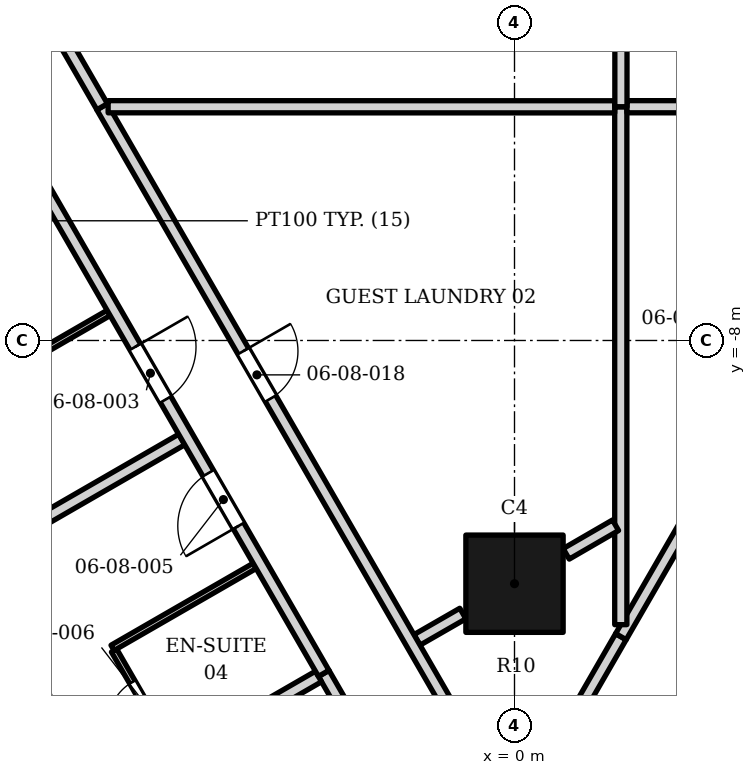
"""IFC4 building model, lengths in metres.
Left out: names, types, materials, properties, quantities, classifications, styles, units other than length and angle.
Written with IfcOpenShell. Run it as: python <this file> out.ifc"""

import sys

from ifc_helpers import new_model, si_unit, direction, frame, frame_2d, origin, origin_2d, place, context, subcontext, project, spatial, rectangle, extrude, element, fill, save


model = new_model("IFC4")
c1 = context("Model", 3, precision=1e-05, world=origin(), true_north=direction((0.0, 1.0)))
c2 = subcontext(c1, "Body", "Model", "MODEL_VIEW")
j1 = project(units=[si_unit("LENGTHUNIT", "METRE"), si_unit("PLANEANGLEUNIT", "RADIAN")], contexts=[c1])
p1 = place(None, origin())
s1 = spatial("IfcSite", under=j1, at=p1, CompositionType="ELEMENT")
p2 = place(p1, origin())
s2 = spatial("IfcBuilding", under=s1, at=p2, CompositionType="ELEMENT")
p3 = place(p2, frame((0.0, 0.0, 46.0)))
s3 = spatial("IfcBuildingStorey", under=s2, at=p3, CompositionType="ELEMENT", Elevation=46.0)
p4 = place(p3, frame((0.0, -12.0, 0.0), z_axis=(0.0, 0.0, 1.0), x_axis=(1.0, 0.0, 0.0)))
e1 = element("IfcColumn", 1, at=p4, inside=s3, PredefinedType="COLUMN", context=c2, shape_type="SweptSolid", body=[
    extrude(rectangle(XDim=1.6, YDim=1.6, at=origin_2d()), origin(), (0.0, 0.0, 1.0), 3.4),
])
p5 = place(p3, frame((-3.137, -13.476, 0.0), z_axis=(0.0, 0.0, 1.0), x_axis=(0.499989943423, -0.866031209874, 0.0)))
e2 = element("IfcWall", 2, at=p5, inside=s3, PredefinedType="PARTITIONING", context=c2, shape_type="SweptSolid", body=[
    extrude(rectangle(XDim=4.398, YDim=0.2, at=frame_2d((2.199, 0.0))), origin(), (0.0, 0.0, 1.0), 3.23),
])
p6 = place(p5, frame((1.798, 0.0, 0.0)))
e3 = element("IfcOpeningElement", 3, at=p6, cuts=e2, PredefinedType="OPENING", context=c2, shape_type="SweptSolid", body=[
    extrude(rectangle(XDim=0.9, YDim=2.1, at=frame_2d((0.45, 1.05))), frame((0.0, 0.11, 0.0), z_axis=(0.0, -1.0, 0.0), x_axis=(1.0, 0.0, 0.0)), (0.0, 0.0, 1.0), 0.22),
])
p7 = place(p3, frame((0.05, -15.818, 0.0), z_axis=(0.0, 0.0, 1.0), x_axis=(0.499521489101, 0.866301495974, 0.0)))
e4 = element("IfcWall", 4, at=p7, inside=s3, PredefinedType="PARTITIONING", context=c2, shape_type="SweptSolid", body=[
    extrude(rectangle(XDim=3.401, YDim=0.2, at=frame_2d((1.7, 0.0))), origin(), (0.0, 0.0, 1.0), 2.628),
])
p8 = place(p7, frame((1.2, 0.0, 0.0)))
e5 = element("IfcOpeningElement", 5, at=p8, cuts=e4, PredefinedType="OPENING", context=c2, shape_type="SweptSolid", body=[
    extrude(rectangle(XDim=0.9, YDim=2.1, at=frame_2d((0.45, 1.05))), frame((0.0, 0.11, 0.0), z_axis=(0.0, -1.0, 0.0), x_axis=(1.0, 0.0, 0.0)), (0.0, 0.0, 1.0), 0.22),
])
p9 = place(p3, frame((-5.563, -14.874, 0.0), z_axis=(0.0, 0.0, 1.0), x_axis=(0.866384216157, 0.499378003114, 0.0)))
e6 = element("IfcWall", 6, at=p9, inside=s3, PredefinedType="PARTITIONING", context=c2, shape_type="SweptSolid", body=[
    extrude(rectangle(XDim=2.7, YDim=0.2, at=frame_2d((1.35, 0.0))), origin(), (0.0, 0.0, 1.0), 2.552),
])
p10 = place(p3, frame((-6.586, -13.098, 0.0), z_axis=(0.0, 0.0, 1.0), x_axis=(0.49995005938, -0.866054235095, 0.0)))
e7 = element("IfcWall", 7, at=p10, inside=s3, PredefinedType="PARTITIONING", context=c2, shape_type="SweptSolid", body=[
    extrude(rectangle(XDim=1.95, YDim=0.1, at=frame_2d((0.975, 0.0))), origin(), (0.0, 0.0, 1.0), 3.23),
])
p11 = place(p10, frame((0.6, 0.0, 0.0)))
e8 = element("IfcOpeningElement", 8, at=p11, cuts=e7, PredefinedType="OPENING", context=c2, shape_type="SweptSolid", body=[
    extrude(rectangle(XDim=0.8, YDim=2.1, at=frame_2d((0.4, 1.05))), frame((0.0, 0.06, 0.0), z_axis=(0.0, -1.0, 0.0), x_axis=(1.0, 0.0, 0.0)), (0.0, 0.0, 1.0), 0.12),
])
p12 = place(p3, frame((-1.604, -12.924, 0.0), z_axis=(0.0, 0.0, 1.0), x_axis=(0.866960927484, 0.498376113207, 0.0)))
e9 = element("IfcWall", 9, at=p12, inside=s3, PredefinedType="PARTITIONING", context=c2, shape_type="SweptSolid", body=[
    extrude(rectangle(XDim=0.869, YDim=0.2, at=frame_2d((0.435, 0.0))), origin(), (0.0, 0.0, 1.0), 3.23),
])
p13 = place(p3, frame((1.75, -12.87, 0.0), z_axis=(0.0, 0.0, 1.0), x_axis=(0.499999309361, 0.866025802525, 0.0)))
e10 = element("IfcWall", 10, at=p13, inside=s3, PredefinedType="PARTITIONING", context=c2, shape_type="SweptSolid", body=[
    extrude(rectangle(XDim=19.134, YDim=0.2, at=frame_2d((9.567, 0.0))), origin(), (0.0, 0.0, 1.0), 2.302),
])
p14 = place(p13, frame((14.098, 0.0, 0.0)))
e11 = element("IfcOpeningElement", 11, at=p14, cuts=e10, PredefinedType="OPENING", context=c2, shape_type="SweptSolid", body=[
    extrude(rectangle(XDim=1.0, YDim=2.1, at=frame_2d((0.5, 1.05))), frame((0.0, 0.11, 0.0), z_axis=(0.0, -1.0, 0.0), x_axis=(1.0, 0.0, 0.0)), (0.0, 0.0, 1.0), 0.22),
])
p15 = place(p13, frame((4.53, 0.0, 0.0)))
e12 = element("IfcOpeningElement", 12, at=p15, cuts=e10, PredefinedType="OPENING", context=c2, shape_type="SweptSolid", body=[
    extrude(rectangle(XDim=1.0, YDim=2.1, at=frame_2d((0.5, 1.05))), frame((0.0, 0.11, 0.0), z_axis=(0.0, -1.0, 0.0), x_axis=(1.0, 0.0, 0.0)), (0.0, 0.0, 1.0), 0.22),
])
p16 = place(p3, frame((1.748, -12.674, 0.0), z_axis=(0.0, 0.0, 1.0), x_axis=(0.0, 1.0, 0.0)))
e13 = element("IfcWall", 13, at=p16, inside=s3, PredefinedType="PARTITIONING", context=c2, shape_type="SweptSolid", body=[
    extrude(rectangle(XDim=8.516, YDim=0.2, at=frame_2d((4.258, 0.0))), origin(), (0.0, 0.0, 1.0), 2.302),
])
p17 = place(p3, frame((-6.611, -13.054, 0.0), z_axis=(0.0, 0.0, 1.0), x_axis=(0.866339109022, 0.499456252518, 0.0)))
e14 = element("IfcWall", 14, at=p17, inside=s3, PredefinedType="PARTITIONING", context=c2, shape_type="SweptSolid", body=[
    extrude(rectangle(XDim=2.7, YDim=0.1, at=frame_2d((1.35, 0.0))), origin(), (0.0, 0.0, 1.0), 2.302),
])
p18 = place(p3, frame((0.85, -11.509, 0.0), z_axis=(0.0, 0.0, 1.0), x_axis=(0.865248014814, 0.501344066345, 0.0)))
e15 = element("IfcWall", 15, at=p18, inside=s3, PredefinedType="PARTITIONING", context=c2, shape_type="SweptSolid", body=[
    extrude(rectangle(XDim=0.938, YDim=0.2, at=frame_2d((0.469, 0.0))), origin(), (0.0, 0.0, 1.0), 3.23),
])
p19 = place(p3, frame((-11.751, -13.251, 0.0), z_axis=(0.0, 0.0, 1.0), x_axis=(0.866134002969, 0.499811853502, 0.0)))
e16 = element("IfcWall", 16, at=p19, inside=s3, PredefinedType="PARTITIONING", context=c2, shape_type="SweptSolid", body=[
    extrude(rectangle(XDim=7.25, YDim=0.2, at=frame_2d((3.625, 0.0))), origin(), (0.0, 0.0, 1.0), 2.302),
])
p20 = place(p19, frame((1.3, 0.0, 0.0)))
e17 = element("IfcOpeningElement", 17, at=p20, cuts=e16, PredefinedType="OPENING", context=c2, shape_type="SweptSolid", body=[
    extrude(rectangle(XDim=0.9, YDim=2.1, at=frame_2d((0.45, 1.05))), frame((0.0, 0.11, 0.0), z_axis=(0.0, -1.0, 0.0), x_axis=(1.0, 0.0, 0.0)), (0.0, 0.0, 1.0), 0.22),
])
p21 = place(p3, frame((-9.011, -8.898, 0.0), z_axis=(0.0, 0.0, 1.0), x_axis=(0.865671764241, 0.500612022024, 0.0)))
e18 = element("IfcWall", 18, at=p21, inside=s3, PredefinedType="PARTITIONING", context=c2, shape_type="SweptSolid", body=[
    extrude(rectangle(XDim=2.7, YDim=0.1, at=frame_2d((1.35, 0.0))), origin(), (0.0, 0.0, 1.0), 2.552),
])
p22 = place(p3, frame((-6.783, -4.156, 0.0), z_axis=(0.0, 0.0, 1.0), x_axis=(0.500162761554, -0.865931412962, 0.0)))
e19 = element("IfcWall", 19, at=p22, inside=s3, PredefinedType="PARTITIONING", context=c2, shape_type="SweptSolid", body=[
    extrude(rectangle(XDim=13.566, YDim=0.2, at=frame_2d((6.783, 0.0))), origin(), (0.0, 0.0, 1.0), 2.302),
])
p23 = place(p22, frame((4.642, 0.0, 0.0)))
e20 = element("IfcOpeningElement", 20, at=p23, cuts=e19, PredefinedType="OPENING", context=c2, shape_type="SweptSolid", body=[
    extrude(rectangle(XDim=0.9, YDim=2.1, at=frame_2d((0.45, 1.05))), frame((0.0, 0.11, 0.0), z_axis=(0.0, -1.0, 0.0), x_axis=(1.0, 0.0, 0.0)), (0.0, 0.0, 1.0), 0.22),
])
p24 = place(p3, frame((-6.683, -4.156, 0.0), z_axis=(0.0, 0.0, 1.0), x_axis=(0.99999997896, -0.000205134212, 0.0)))
e21 = element("IfcWall", 21, at=p24, inside=s3, PredefinedType="PARTITIONING", context=c2, shape_type="SweptSolid", body=[
    extrude(rectangle(XDim=8.331, YDim=0.2, at=frame_2d((4.166, 0.0))), origin(), (0.0, 0.0, 1.0), 3.23),
])
p25 = place(p3, frame((1.85, -4.156, 0.0), z_axis=(0.0, 0.0, 1.0), x_axis=(0.999999937456, -0.000353678232, 0.0)))
e22 = element("IfcWall", 22, at=p25, inside=s3, PredefinedType="PARTITIONING", context=c2, shape_type="SweptSolid", body=[
    extrude(rectangle(XDim=4.832, YDim=0.2, at=frame_2d((2.416, 0.0))), origin(), (0.0, 0.0, 1.0), 3.23),
])
p26 = place(p3, frame((-9.937, -1.698, 0.0), z_axis=(0.0, 0.0, 1.0), x_axis=(0.500001173101, -0.866024726493, 0.0)))
e23 = element("IfcWall", 23, at=p26, inside=s3, PredefinedType="PARTITIONING", context=c2, shape_type="SweptSolid", body=[
    extrude(rectangle(XDim=13.598, YDim=0.2, at=frame_2d((6.799, 0.0))), origin(), (0.0, 0.0, 1.0), 2.302),
])
p27 = place(p26, frame((0.598, 0.0, 0.0)))
e24 = element("IfcOpeningElement", 24, at=p27, cuts=e23, PredefinedType="OPENING", context=c2, shape_type="SweptSolid", body=[
    extrude(rectangle(XDim=1.1, YDim=2.1, at=frame_2d((0.55, 1.05))), frame((0.0, 0.11, 0.0), z_axis=(0.0, -1.0, 0.0), x_axis=(1.0, 0.0, 0.0)), (0.0, 0.0, 1.0), 0.22),
])
p28 = place(p26, frame((7.398, 0.0, 0.0)))
e25 = element("IfcOpeningElement", 25, at=p28, cuts=e23, PredefinedType="OPENING", context=c2, shape_type="SweptSolid", body=[
    extrude(rectangle(XDim=1.0, YDim=2.1, at=frame_2d((0.5, 1.05))), frame((0.0, 0.11, 0.0), z_axis=(0.0, -1.0, 0.0), x_axis=(1.0, 0.0, 0.0)), (0.0, 0.0, 1.0), 0.22),
])
p29 = place(p26, frame((9.798, 0.0, 0.0)))
e26 = element("IfcOpeningElement", 26, at=p29, cuts=e23, PredefinedType="OPENING", context=c2, shape_type="SweptSolid", body=[
    extrude(rectangle(XDim=1.0, YDim=2.1, at=frame_2d((0.5, 1.05))), frame((0.0, 0.11, 0.0), z_axis=(0.0, -1.0, 0.0), x_axis=(1.0, 0.0, 0.0)), (0.0, 0.0, 1.0), 0.22),
])
p30 = place(p3, frame((1.438, -16.419, 0.0), z_axis=(0.0, 0.0, 1.0), x_axis=(0.499996012009, 0.86602770624, 0.0)))
e27 = element("IfcWall", 27, at=p30, inside=s3, PredefinedType="PARTITIONING", context=c2, shape_type="SweptSolid", body=[
    extrude(rectangle(XDim=18.0, YDim=0.2, at=frame_2d((9.0, 0.0))), origin(), (0.0, 0.0, 1.0), 2.302),
])
p31 = place(p30, frame((4.0, 0.0, 0.0)))
e28 = element("IfcOpeningElement", 28, at=p31, cuts=e27, PredefinedType="OPENING", context=c2, shape_type="SweptSolid", body=[
    extrude(rectangle(XDim=1.0, YDim=2.1, at=frame_2d((0.5, 1.05))), frame((0.0, 0.11, 0.0), z_axis=(0.0, -1.0, 0.0), x_axis=(1.0, 0.0, 0.0)), (0.0, 0.0, 1.0), 0.22),
])
p32 = place(p30, frame((9.8, 0.0, 0.0)))
e29 = element("IfcOpeningElement", 29, at=p32, cuts=e27, PredefinedType="OPENING", context=c2, shape_type="SweptSolid", body=[
    extrude(rectangle(XDim=1.1, YDim=2.1, at=frame_2d((0.55, 1.05))), frame((0.0, 0.11, 0.0), z_axis=(0.0, -1.0, 0.0), x_axis=(1.0, 0.0, 0.0)), (0.0, 0.0, 1.0), 0.22),
])
p33 = place(p3, frame((1.75, -4.156, 0.0), z_axis=(0.0, 0.0, 1.0), x_axis=(0.000258617496, 0.999999966558, 0.0)))
e30 = element("IfcWall", 30, at=p33, inside=s3, PredefinedType="PARTITIONING", context=c2, shape_type="SweptSolid", body=[
    extrude(rectangle(XDim=6.608, YDim=0.2, at=frame_2d((3.304, 0.0))), origin(), (0.0, 0.0, 1.0), 3.23),
])
p34 = place(p3, frame((-11.319, 3.7, 0.0), z_axis=(0.0, 0.0, 1.0), x_axis=(0.500165052219, -0.865930089868, 0.0)))
e31 = element("IfcWall", 31, at=p34, inside=s3, PredefinedType="PARTITIONING", context=c2, shape_type="SweptSolid", body=[
    extrude(rectangle(XDim=9.072, YDim=0.2, at=frame_2d((4.536, 0.0))), origin(), (0.0, 0.0, 1.0), 2.552),
])
p35 = place(p34, frame((6.758, 0.0, 0.0)))
e32 = element("IfcOpeningElement", 32, at=p35, cuts=e31, PredefinedType="OPENING", context=c2, shape_type="SweptSolid", body=[
    extrude(rectangle(XDim=1.0, YDim=2.1, at=frame_2d((0.5, 1.05))), frame((0.0, 0.11, 0.0), z_axis=(0.0, -1.0, 0.0), x_axis=(1.0, 0.0, 0.0)), (0.0, 0.0, 1.0), 0.22),
])
p36 = place(p34, frame((3.466, 0.0, 0.0)))
e33 = element("IfcOpeningElement", 33, at=p36, cuts=e31, PredefinedType="OPENING", context=c2, shape_type="SweptSolid", body=[
    extrude(rectangle(XDim=1.0, YDim=2.1, at=frame_2d((0.5, 1.05))), frame((0.0, 0.11, 0.0), z_axis=(0.0, -1.0, 0.0), x_axis=(1.0, 0.0, 0.0)), (0.0, 0.0, 1.0), 0.22),
])
p37 = place(p28, origin())
e34 = element("IfcDoor", 34, at=p37, inside=s3, OperationType="SINGLE_SWING_LEFT", PredefinedType="DOOR", context=c2, shape_type="SweptSolid", body=[
    extrude(rectangle(XDim=1.0, YDim=2.1, at=frame_2d((0.5, 1.05))), frame((0.0, 0.025, 0.0), z_axis=(0.0, -1.0, 0.0), x_axis=(1.0, 0.0, 0.0)), (0.0, 0.0, 1.0), 0.05),
])
fill(e25, e34)
p38 = place(p29, origin())
e35 = element("IfcDoor", 35, at=p38, inside=s3, OperationType="SINGLE_SWING_RIGHT", PredefinedType="DOOR", context=c2, shape_type="SweptSolid", body=[
    extrude(rectangle(XDim=1.0, YDim=2.1, at=frame_2d((0.5, 1.05))), frame((0.0, 0.025, 0.0), z_axis=(0.0, -1.0, 0.0), x_axis=(1.0, 0.0, 0.0)), (0.0, 0.0, 1.0), 0.05),
])
fill(e26, e35)
p39 = place(p11, origin())
e36 = element("IfcDoor", 36, at=p39, inside=s3, OperationType="SINGLE_SWING_RIGHT", PredefinedType="DOOR", context=c2, shape_type="SweptSolid", body=[
    extrude(rectangle(XDim=0.8, YDim=2.1, at=frame_2d((0.4, 1.05))), frame((0.0, 0.025, 0.0), z_axis=(0.0, -1.0, 0.0), x_axis=(1.0, 0.0, 0.0)), (0.0, 0.0, 1.0), 0.05),
])
fill(e8, e36)
p40 = place(p23, origin())
e37 = element("IfcDoor", 37, at=p40, inside=s3, OperationType="SINGLE_SWING_LEFT", PredefinedType="DOOR", context=c2, shape_type="SweptSolid", body=[
    extrude(rectangle(XDim=0.9, YDim=2.1, at=frame_2d((0.45, 1.05))), frame((0.0, 0.025, 0.0), z_axis=(0.0, -1.0, 0.0), x_axis=(1.0, 0.0, 0.0)), (0.0, 0.0, 1.0), 0.05),
])
fill(e20, e37)
save(model, sys.argv[1])
